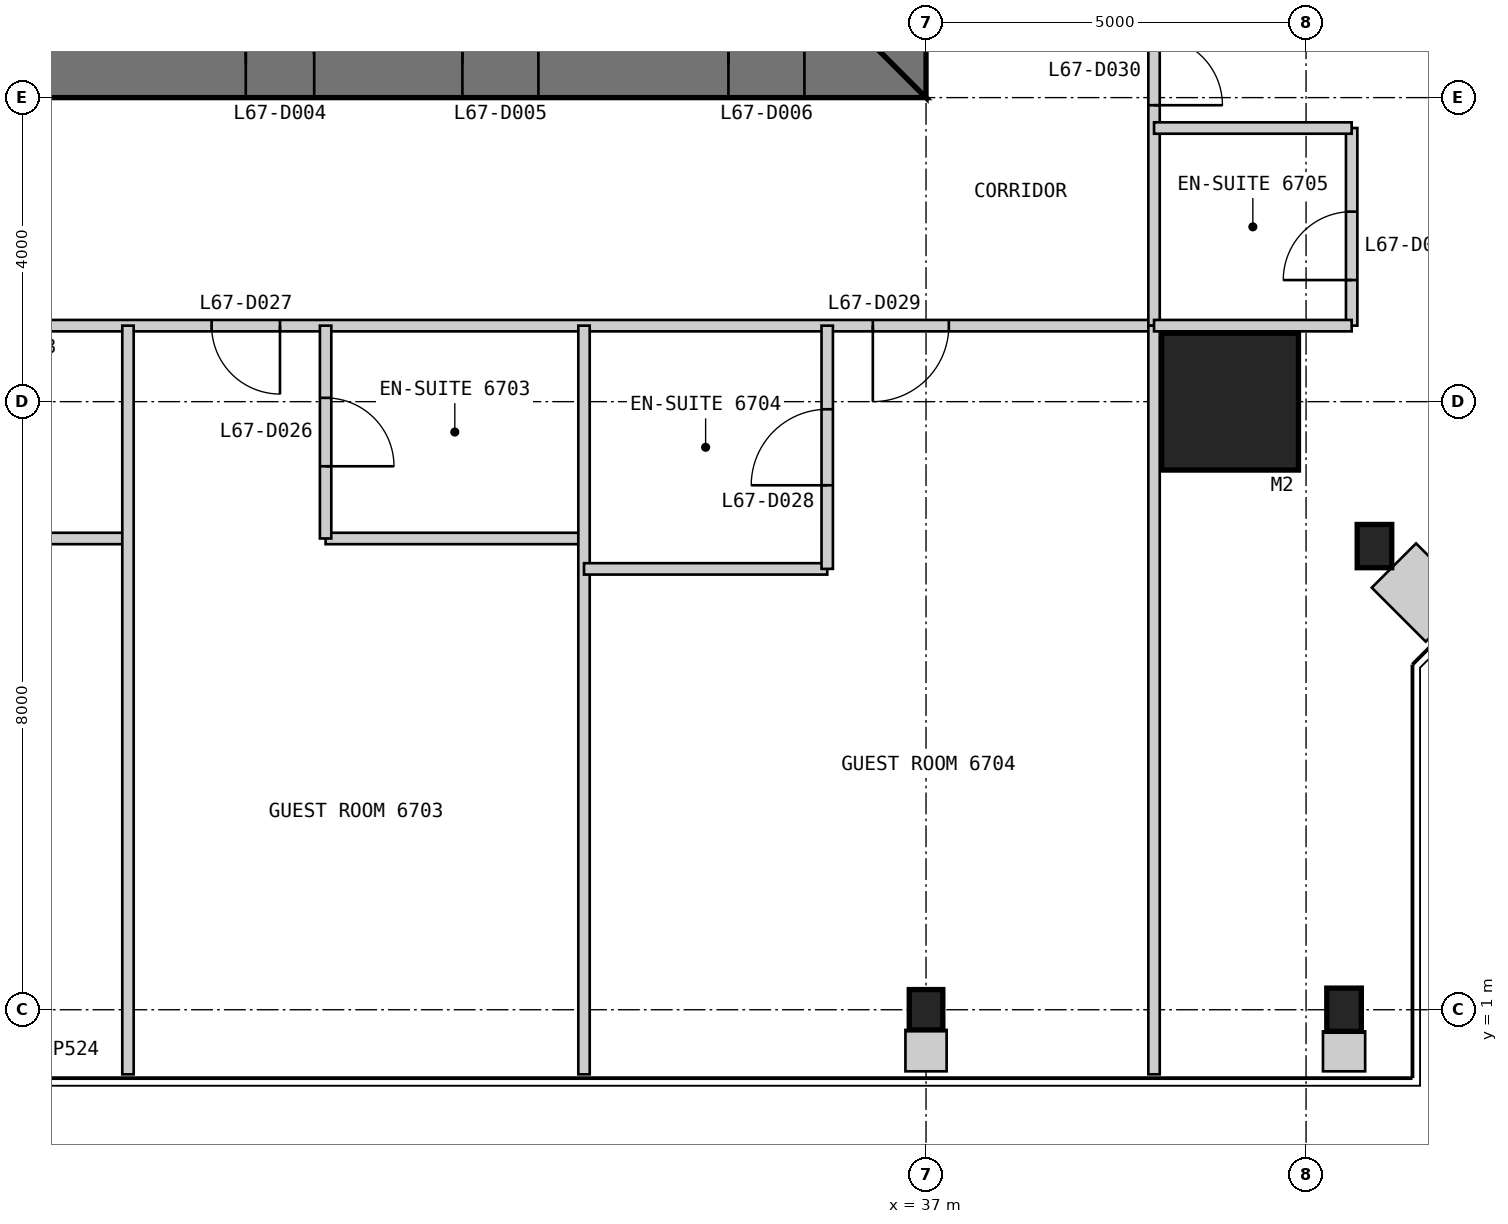
"""IFC4 building model, lengths in metres.
Left out: names, types, materials, properties, quantities, classifications, styles, units other than length and angle.
Written with IfcOpenShell. Run it as: python <this file> out.ifc"""

import sys

from ifc_helpers import new_model, si_unit, direction, frame, frame_2d, origin, origin_2d, place, context, subcontext, project, spatial, polyline, rectangle, i_section, outline, extrude, element, fill, save


model = new_model("IFC4")
c1 = context("Model", 3, precision=1e-05, world=origin(), true_north=direction((0.0, 1.0)))
c2 = subcontext(c1, "Body", "Model", "MODEL_VIEW")
j1 = project(units=[si_unit("LENGTHUNIT", "METRE"), si_unit("PLANEANGLEUNIT", "RADIAN")], contexts=[c1])
p1 = place(None, origin())
s1 = spatial("IfcSite", under=j1, at=p1, CompositionType="ELEMENT")
p2 = place(p1, origin())
s2 = spatial("IfcBuilding", under=s1, at=p2, CompositionType="ELEMENT")
p3 = place(p2, frame((0.0, 0.0, 279.8)))
s3 = spatial("IfcBuildingStorey", under=s2, at=p3, CompositionType="ELEMENT", Elevation=279.8)
p4 = place(p3, frame((41.0, 9.0, 0.0), z_axis=(0.0, 0.0, 1.0), x_axis=(1.0, 0.0, 0.0)))
e1 = element("IfcColumn", 1, at=p4, inside=s3, PredefinedType="COLUMN", context=c2, shape_type="SweptSolid", body=[
    extrude(rectangle(XDim=1.8, YDim=1.8, at=origin_2d()), origin(), (0.0, 0.0, 1.0), 3.4),
])
p5 = place(p3, frame((37.0, 1.0, 0.0), z_axis=(0.0, 0.0, 1.0), x_axis=(1.0, 0.0, 0.0)))
e2 = element("IfcColumn", 2, at=p5, inside=s3, PredefinedType="COLUMN", context=c2, shape_type="SweptSolid", body=[
    extrude(i_section(OverallWidth=0.442, OverallDepth=0.531, WebThickness=0.066, FlangeThickness=0.106, at=origin_2d()), origin(), (0.0, 0.0, 1.0), 3.4),
])
for number, where, z_axis, x_axis in (
    (3, (42.5, 1.0, 0.0), (0.0, 0.0, 1.0), (1.0, 0.0, 0.0)),
    (4, (42.9, 7.1, 0.0), (0.0, 0.0, 1.0), (1.0, 0.0, 0.0)),
):
    element("IfcColumn", number, at=place(p3, frame(where, z_axis=z_axis, x_axis=x_axis)), inside=s3, PredefinedType="COLUMN", context=c2, shape_type="SweptSolid", body=[
        extrude(i_section(OverallWidth=0.455, OverallDepth=0.569, WebThickness=0.078, FlangeThickness=0.125, at=origin_2d()), origin(), (0.0, 0.0, 1.0), 3.4),
    ])
p6 = place(p3, frame((13.0, 13.45, 0.0), z_axis=(0.0, 0.0, 1.0), x_axis=(1.0, 0.0, 0.0)))
e5 = element("IfcWall", 5, at=p6, inside=s3, PredefinedType="SHEAR", context=c2, shape_type="SweptSolid", body=[
    extrude(outline(polyline([(0.0, -0.45), (24.0, -0.45), (23.1, 0.45), (0.9, 0.45), (0.0, -0.45)])), origin(), (0.0, 0.0, 1.0), 3.4),
])
p7 = place(p6, frame((4.9, 0.0, 0.0)))
e6 = element("IfcOpeningElement", 6, at=p7, cuts=e5, PredefinedType="OPENING", context=c2, shape_type="SweptSolid", body=[
    extrude(rectangle(XDim=1.0, YDim=2.2, at=frame_2d((0.5, 1.1))), frame((0.0, 0.46, 0.0), z_axis=(0.0, -1.0, 0.0), x_axis=(1.0, 0.0, 0.0)), (0.0, 0.0, 1.0), 0.92),
])
p8 = place(p6, frame((8.9, 0.0, 0.0)))
e7 = element("IfcOpeningElement", 7, at=p8, cuts=e5, PredefinedType="OPENING", context=c2, shape_type="SweptSolid", body=[
    extrude(rectangle(XDim=1.1, YDim=2.2, at=frame_2d((0.55, 1.1))), frame((0.0, 0.46, 0.0), z_axis=(0.0, -1.0, 0.0), x_axis=(1.0, 0.0, 0.0)), (0.0, 0.0, 1.0), 0.92),
])
p9 = place(p6, frame((15.05, 0.0, 0.0)))
e8 = element("IfcOpeningElement", 8, at=p9, cuts=e5, PredefinedType="OPENING", context=c2, shape_type="SweptSolid", body=[
    extrude(rectangle(XDim=0.9, YDim=2.2, at=frame_2d((0.45, 1.1))), frame((0.0, 0.46, 0.0), z_axis=(0.0, -1.0, 0.0), x_axis=(1.0, 0.0, 0.0)), (0.0, 0.0, 1.0), 0.92),
])
p10 = place(p6, frame((17.9, 0.0, 0.0)))
e9 = element("IfcOpeningElement", 9, at=p10, cuts=e5, PredefinedType="OPENING", context=c2, shape_type="SweptSolid", body=[
    extrude(rectangle(XDim=1.0, YDim=2.2, at=frame_2d((0.5, 1.1))), frame((0.0, 0.46, 0.0), z_axis=(0.0, -1.0, 0.0), x_axis=(1.0, 0.0, 0.0)), (0.0, 0.0, 1.0), 0.92),
])
p11 = place(p6, frame((21.4, 0.0, 0.0)))
e10 = element("IfcOpeningElement", 10, at=p11, cuts=e5, PredefinedType="OPENING", context=c2, shape_type="SweptSolid", body=[
    extrude(rectangle(XDim=1.0, YDim=2.2, at=frame_2d((0.5, 1.1))), frame((0.0, 0.46, 0.0), z_axis=(0.0, -1.0, 0.0), x_axis=(1.0, 0.0, 0.0)), (0.0, 0.0, 1.0), 0.92),
])
p12 = place(p3, frame((36.55, 13.9, 0.0), z_axis=(0.0, 0.0, 1.0), x_axis=(0.0, 1.0, 0.0)))
e11 = element("IfcWall", 11, at=p12, inside=s3, PredefinedType="SHEAR", context=c2, shape_type="SweptSolid", body=[
    extrude(outline(polyline([(-0.9, -0.45), (23.1, -0.45), (22.2, 0.45), (0.0, 0.45), (-0.9, -0.45)])), origin(), (0.0, 0.0, 1.0), 3.4),
])
p13 = place(p12, frame((20.2, 0.0, 0.0)))
e12 = element("IfcOpeningElement", 12, at=p13, cuts=e11, PredefinedType="OPENING", context=c2, shape_type="SweptSolid", body=[
    extrude(rectangle(XDim=1.0, YDim=2.2, at=frame_2d((0.5, 1.1))), frame((0.0, 0.46, 0.0), z_axis=(0.0, -1.0, 0.0), x_axis=(1.0, 0.0, 0.0)), (0.0, 0.0, 1.0), 0.92),
])
p14 = place(p12, frame((17.25, 0.0, 0.0)))
e13 = element("IfcOpeningElement", 13, at=p14, cuts=e11, PredefinedType="OPENING", context=c2, shape_type="SweptSolid", body=[
    extrude(rectangle(XDim=0.9, YDim=2.2, at=frame_2d((0.45, 1.1))), frame((0.0, 0.46, 0.0), z_axis=(0.0, -1.0, 0.0), x_axis=(1.0, 0.0, 0.0)), (0.0, 0.0, 1.0), 0.92),
])
p15 = place(p3, frame((10.0, 10.0, 0.0), z_axis=(0.0, 0.0, 1.0), x_axis=(1.0, 0.0, 0.0)))
e14 = element("IfcWall", 14, at=p15, inside=s3, PredefinedType="PARTITIONING", context=c2, shape_type="SweptSolid", body=[
    extrude(rectangle(XDim=30.0, YDim=0.15, at=frame_2d((15.0, 0.0))), origin(), (0.0, 0.0, 1.0), 3.25),
])
p16 = place(p15, frame((2.9, 0.0, 0.0)))
e15 = element("IfcOpeningElement", 15, at=p16, cuts=e14, PredefinedType="OPENING", context=c2, shape_type="SweptSolid", body=[
    extrude(rectangle(XDim=0.9, YDim=2.1, at=frame_2d((0.45, 1.05))), frame((0.0, 0.085, 0.0), z_axis=(0.0, -1.0, 0.0), x_axis=(1.0, 0.0, 0.0)), (0.0, 0.0, 1.0), 0.17),
])
p17 = place(p15, frame((11.2, 0.0, 0.0)))
e16 = element("IfcOpeningElement", 16, at=p17, cuts=e14, PredefinedType="OPENING", context=c2, shape_type="SweptSolid", body=[
    extrude(rectangle(XDim=0.9, YDim=2.1, at=frame_2d((0.45, 1.05))), frame((0.0, 0.085, 0.0), z_axis=(0.0, -1.0, 0.0), x_axis=(1.0, 0.0, 0.0)), (0.0, 0.0, 1.0), 0.17),
])
p18 = place(p15, frame((17.6, 0.0, 0.0)))
e17 = element("IfcOpeningElement", 17, at=p18, cuts=e14, PredefinedType="OPENING", context=c2, shape_type="SweptSolid", body=[
    extrude(rectangle(XDim=0.9, YDim=2.1, at=frame_2d((0.45, 1.05))), frame((0.0, 0.085, 0.0), z_axis=(0.0, -1.0, 0.0), x_axis=(1.0, 0.0, 0.0)), (0.0, 0.0, 1.0), 0.17),
])
p19 = place(p15, frame((26.3, 0.0, 0.0)))
e18 = element("IfcOpeningElement", 18, at=p19, cuts=e14, PredefinedType="OPENING", context=c2, shape_type="SweptSolid", body=[
    extrude(rectangle(XDim=1.0, YDim=2.1, at=frame_2d((0.5, 1.05))), frame((0.0, 0.085, 0.0), z_axis=(0.0, -1.0, 0.0), x_axis=(1.0, 0.0, 0.0)), (0.0, 0.0, 1.0), 0.17),
])
p20 = place(p3, frame((22.7, 7.2, 0.0), z_axis=(0.0, 0.0, 1.0), x_axis=(1.0, 0.0, 0.0)))
e19 = element("IfcWall", 19, at=p20, inside=s3, PredefinedType="PARTITIONING", context=c2, shape_type="SweptSolid", body=[
    extrude(rectangle(XDim=3.8, YDim=0.15, at=frame_2d((1.9, 0.0))), origin(), (0.0, 0.0, 1.0), 3.25),
])
p21 = place(p3, frame((26.5, 0.15, 0.0), z_axis=(0.0, 0.0, 1.0), x_axis=(0.0, 1.0, 0.0)))
e20 = element("IfcWall", 20, at=p21, inside=s3, PredefinedType="PARTITIONING", context=c2, shape_type="SweptSolid", body=[
    extrude(rectangle(XDim=9.85, YDim=0.15, at=frame_2d((4.925, 0.0))), origin(), (0.0, 0.0, 1.0), 3.25),
])
p22 = place(p3, frame((29.1, 7.2, 0.0), z_axis=(0.0, 0.0, 1.0), x_axis=(1.0, 0.0, 0.0)))
e21 = element("IfcWall", 21, at=p22, inside=s3, PredefinedType="PARTITIONING", context=c2, shape_type="SweptSolid", body=[
    extrude(rectangle(XDim=3.4, YDim=0.15, at=frame_2d((1.7, 0.0))), origin(), (0.0, 0.0, 1.0), 3.25),
])
p23 = place(p3, frame((29.1, 7.2, 0.0), z_axis=(0.0, 0.0, 1.0), x_axis=(0.0, 1.0, 0.0)))
e22 = element("IfcWall", 22, at=p23, inside=s3, PredefinedType="PARTITIONING", context=c2, shape_type="SweptSolid", body=[
    extrude(rectangle(XDim=2.8, YDim=0.15, at=frame_2d((1.4, 0.0))), origin(), (0.0, 0.0, 1.0), 3.25),
])
p24 = place(p23, frame((0.95, 0.0, 0.0)))
e23 = element("IfcOpeningElement", 23, at=p24, cuts=e22, PredefinedType="OPENING", context=c2, shape_type="SweptSolid", body=[
    extrude(rectangle(XDim=0.9, YDim=2.1, at=frame_2d((0.45, 1.05))), frame((0.0, 0.085, 0.0), z_axis=(0.0, -1.0, 0.0), x_axis=(1.0, 0.0, 0.0)), (0.0, 0.0, 1.0), 0.17),
])
p25 = place(p3, frame((32.5, 0.15, 0.0), z_axis=(0.0, 0.0, 1.0), x_axis=(0.0, 1.0, 0.0)))
e24 = element("IfcWall", 24, at=p25, inside=s3, PredefinedType="PARTITIONING", context=c2, shape_type="SweptSolid", body=[
    extrude(rectangle(XDim=9.85, YDim=0.15, at=frame_2d((4.925, 0.0))), origin(), (0.0, 0.0, 1.0), 3.25),
])
p26 = place(p3, frame((32.5, 6.8, 0.0), z_axis=(0.0, 0.0, 1.0), x_axis=(1.0, 0.0, 0.0)))
e25 = element("IfcWall", 25, at=p26, inside=s3, PredefinedType="PARTITIONING", context=c2, shape_type="SweptSolid", body=[
    extrude(rectangle(XDim=3.2, YDim=0.15, at=frame_2d((1.6, 0.0))), origin(), (0.0, 0.0, 1.0), 3.25),
])
p27 = place(p3, frame((35.7, 6.8, 0.0), z_axis=(0.0, 0.0, 1.0), x_axis=(0.0, 1.0, 0.0)))
e26 = element("IfcWall", 26, at=p27, inside=s3, PredefinedType="PARTITIONING", context=c2, shape_type="SweptSolid", body=[
    extrude(rectangle(XDim=3.2, YDim=0.15, at=frame_2d((1.6, 0.0))), origin(), (0.0, 0.0, 1.0), 3.25),
])
p28 = place(p27, frame((1.1, 0.0, 0.0)))
e27 = element("IfcOpeningElement", 27, at=p28, cuts=e26, PredefinedType="OPENING", context=c2, shape_type="SweptSolid", body=[
    extrude(rectangle(XDim=1.0, YDim=2.1, at=frame_2d((0.5, 1.05))), frame((0.0, 0.085, 0.0), z_axis=(0.0, -1.0, 0.0), x_axis=(1.0, 0.0, 0.0)), (0.0, 0.0, 1.0), 0.17),
])
p29 = place(p3, frame((40.0, 10.0, 0.0), z_axis=(0.0, 0.0, 1.0), x_axis=(0.0, 1.0, 0.0)))
e28 = element("IfcWall", 28, at=p29, inside=s3, PredefinedType="PARTITIONING", context=c2, shape_type="SweptSolid", body=[
    extrude(rectangle(XDim=30.0, YDim=0.15, at=frame_2d((15.0, 0.0))), origin(), (0.0, 0.0, 1.0), 2.638),
])
p30 = place(p29, frame((2.9, 0.0, 0.0)))
e29 = element("IfcOpeningElement", 29, at=p30, cuts=e28, PredefinedType="OPENING", context=c2, shape_type="SweptSolid", body=[
    extrude(rectangle(XDim=0.9, YDim=2.1, at=frame_2d((0.45, 1.05))), frame((0.0, 0.085, 0.0), z_axis=(0.0, -1.0, 0.0), x_axis=(1.0, 0.0, 0.0)), (0.0, 0.0, 1.0), 0.17),
])
p31 = place(p29, frame((11.2, 0.0, 0.0)))
e30 = element("IfcOpeningElement", 30, at=p31, cuts=e28, PredefinedType="OPENING", context=c2, shape_type="SweptSolid", body=[
    extrude(rectangle(XDim=0.9, YDim=2.1, at=frame_2d((0.45, 1.05))), frame((0.0, 0.085, 0.0), z_axis=(0.0, -1.0, 0.0), x_axis=(1.0, 0.0, 0.0)), (0.0, 0.0, 1.0), 0.17),
])
p32 = place(p29, frame((24.7, 0.0, 0.0)))
e31 = element("IfcOpeningElement", 31, at=p32, cuts=e28, PredefinedType="OPENING", context=c2, shape_type="SweptSolid", body=[
    extrude(rectangle(XDim=0.9, YDim=2.1, at=frame_2d((0.45, 1.05))), frame((0.0, 0.085, 0.0), z_axis=(0.0, -1.0, 0.0), x_axis=(1.0, 0.0, 0.0)), (0.0, 0.0, 1.0), 0.17),
])
p33 = place(p3, frame((40.0, 0.15, 0.0), z_axis=(0.0, 0.0, 1.0), x_axis=(0.0, 1.0, 0.0)))
e32 = element("IfcWall", 32, at=p33, inside=s3, PredefinedType="PARTITIONING", context=c2, shape_type="SweptSolid", body=[
    extrude(rectangle(XDim=9.85, YDim=0.15, at=frame_2d((4.925, 0.0))), origin(), (0.0, 0.0, 1.0), 3.25),
])
p34 = place(p3, frame((42.6, 10.0, 0.0), z_axis=(0.0, 0.0, 1.0), x_axis=(0.0, 1.0, 0.0)))
e33 = element("IfcWall", 33, at=p34, inside=s3, PredefinedType="PARTITIONING", context=c2, shape_type="SweptSolid", body=[
    extrude(rectangle(XDim=2.6, YDim=0.15, at=frame_2d((1.3, 0.0))), origin(), (0.0, 0.0, 1.0), 3.25),
])
p35 = place(p34, frame((0.6, 0.0, 0.0)))
e34 = element("IfcOpeningElement", 34, at=p35, cuts=e33, PredefinedType="OPENING", context=c2, shape_type="SweptSolid", body=[
    extrude(rectangle(XDim=0.9, YDim=2.1, at=frame_2d((0.45, 1.05))), frame((0.0, 0.085, 0.0), z_axis=(0.0, -1.0, 0.0), x_axis=(1.0, 0.0, 0.0)), (0.0, 0.0, 1.0), 0.17),
])
for number, where, z_axis, x_axis in (
    (35, (42.6, 10.0, 0.0), (0.0, 0.0, 1.0), (-1.0, 0.0, 0.0)),
    (36, (42.6, 12.6, 0.0), (0.0, 0.0, 1.0), (-1.0, 0.0, 0.0)),
):
    element("IfcWall", number, at=place(p3, frame(where, z_axis=z_axis, x_axis=x_axis)), inside=s3, PredefinedType="PARTITIONING", context=c2, shape_type="SweptSolid", body=[
        extrude(rectangle(XDim=2.6, YDim=0.15, at=frame_2d((1.3, 0.0))), origin(), (0.0, 0.0, 1.0), 3.25),
    ])
p36 = place(p3, frame((37.0, 0.19, 0.0), z_axis=(0.0, 0.0, 1.0), x_axis=(0.0, 1.0, 0.0)))
e37 = element("IfcWall", 37, at=p36, inside=s3, PredefinedType="PARTITIONING", context=c2, shape_type="SweptSolid", body=[
    extrude(rectangle(XDim=0.545, YDim=0.542, at=frame_2d((0.272, 0.0))), origin(), (0.0, 0.0, 1.0), 3.25),
])
p37 = place(p3, frame((42.5, 0.19, 0.0), z_axis=(0.0, 0.0, 1.0), x_axis=(0.0, 1.0, 0.0)))
e38 = element("IfcWall", 38, at=p37, inside=s3, PredefinedType="PARTITIONING", context=c2, shape_type="SweptSolid", body=[
    extrude(rectangle(XDim=0.526, YDim=0.555, at=frame_2d((0.263, 0.0))), origin(), (0.0, 0.0, 1.0), 3.25),
])
p38 = place(p3, frame((43.866, 6.134, 0.0), z_axis=(0.0, 0.0, 1.0), x_axis=(-0.707106781187, 0.707106781187, 0.0)))
e39 = element("IfcWall", 39, at=p38, inside=s3, PredefinedType="PARTITIONING", context=c2, shape_type="SweptSolid", body=[
    extrude(rectangle(XDim=1.004, YDim=0.824, at=frame_2d((0.502, 0.0))), origin(), (0.0, 0.0, 1.0), 3.25),
])
p39 = place(p9, origin())
e40 = element("IfcDoor", 40, at=p39, inside=s3, OperationType="SINGLE_SWING_LEFT", PredefinedType="DOOR", context=c2, shape_type="SweptSolid", body=[
    extrude(rectangle(XDim=0.9, YDim=2.2, at=frame_2d((0.45, 1.1))), frame((0.0, 0.025, 0.0), z_axis=(0.0, -1.0, 0.0), x_axis=(1.0, 0.0, 0.0)), (0.0, 0.0, 1.0), 0.05),
    extrude(outline(polyline([(0.0, 0.0), (0.04, 0.0), (0.04, 2.16), (0.86, 2.16), (0.86, 0.0), (0.9, 0.0), (0.9, 2.2), (0.0, 2.2), (0.0, 0.0)])), frame((0.0, 0.3, 0.0), z_axis=(0.0, -1.0, 0.0), x_axis=(1.0, 0.0, 0.0)), (0.0, 0.0, 1.0), 0.6),
])
fill(e8, e40)
p40 = place(p10, origin())
e41 = element("IfcDoor", 41, at=p40, inside=s3, OperationType="SINGLE_SWING_LEFT", PredefinedType="DOOR", context=c2, shape_type="SweptSolid", body=[
    extrude(rectangle(XDim=1.0, YDim=2.2, at=frame_2d((0.5, 1.1))), frame((0.0, 0.025, 0.0), z_axis=(0.0, -1.0, 0.0), x_axis=(1.0, 0.0, 0.0)), (0.0, 0.0, 1.0), 0.05),
    extrude(outline(polyline([(0.0, 0.0), (0.04, 0.0), (0.04, 2.16), (0.96, 2.16), (0.96, 0.0), (1.0, 0.0), (1.0, 2.2), (0.0, 2.2), (0.0, 0.0)])), frame((0.0, 0.3, 0.0), z_axis=(0.0, -1.0, 0.0), x_axis=(1.0, 0.0, 0.0)), (0.0, 0.0, 1.0), 0.6),
])
fill(e9, e41)
p41 = place(p11, origin())
e42 = element("IfcDoor", 42, at=p41, inside=s3, OperationType="SINGLE_SWING_LEFT", PredefinedType="DOOR", context=c2, shape_type="SweptSolid", body=[
    extrude(rectangle(XDim=1.0, YDim=2.2, at=frame_2d((0.5, 1.1))), frame((0.0, 0.025, 0.0), z_axis=(0.0, -1.0, 0.0), x_axis=(1.0, 0.0, 0.0)), (0.0, 0.0, 1.0), 0.05),
    extrude(outline(polyline([(0.0, 0.0), (0.04, 0.0), (0.04, 2.16), (0.96, 2.16), (0.96, 0.0), (1.0, 0.0), (1.0, 2.2), (0.0, 2.2), (0.0, 0.0)])), frame((0.0, 0.3, 0.0), z_axis=(0.0, -1.0, 0.0), x_axis=(1.0, 0.0, 0.0)), (0.0, 0.0, 1.0), 0.6),
])
fill(e10, e42)
p42 = place(p24, frame((0.9, 0.0, 0.0), z_axis=(0.0, 0.0, 1.0), x_axis=(-1.0, 0.0, 0.0)))
e43 = element("IfcDoor", 43, at=p42, inside=s3, OperationType="SINGLE_SWING_RIGHT", PredefinedType="DOOR", context=c2, shape_type="SweptSolid", body=[
    extrude(rectangle(XDim=0.9, YDim=2.1, at=frame_2d((0.45, 1.05))), frame((0.0, 0.025, 0.0), z_axis=(0.0, -1.0, 0.0), x_axis=(1.0, 0.0, 0.0)), (0.0, 0.0, 1.0), 0.05),
])
fill(e23, e43)
p43 = place(p18, frame((0.9, 0.0, 0.0), z_axis=(0.0, 0.0, 1.0), x_axis=(-1.0, 0.0, 0.0)))
e44 = element("IfcDoor", 44, at=p43, inside=s3, OperationType="SINGLE_SWING_LEFT", PredefinedType="DOOR", context=c2, shape_type="SweptSolid", body=[
    extrude(rectangle(XDim=0.9, YDim=2.1, at=frame_2d((0.45, 1.05))), frame((0.0, 0.025, 0.0), z_axis=(0.0, -1.0, 0.0), x_axis=(1.0, 0.0, 0.0)), (0.0, 0.0, 1.0), 0.05),
])
fill(e17, e44)
p44 = place(p28, origin())
e45 = element("IfcDoor", 45, at=p44, inside=s3, OperationType="SINGLE_SWING_LEFT", PredefinedType="DOOR", context=c2, shape_type="SweptSolid", body=[
    extrude(rectangle(XDim=1.0, YDim=2.1, at=frame_2d((0.5, 1.05))), frame((0.0, 0.025, 0.0), z_axis=(0.0, -1.0, 0.0), x_axis=(1.0, 0.0, 0.0)), (0.0, 0.0, 1.0), 0.05),
])
fill(e27, e45)
p45 = place(p19, frame((1.0, 0.0, 0.0), z_axis=(0.0, 0.0, 1.0), x_axis=(-1.0, 0.0, 0.0)))
e46 = element("IfcDoor", 46, at=p45, inside=s3, OperationType="SINGLE_SWING_RIGHT", PredefinedType="DOOR", context=c2, shape_type="SweptSolid", body=[
    extrude(rectangle(XDim=1.0, YDim=2.1, at=frame_2d((0.5, 1.05))), frame((0.0, 0.025, 0.0), z_axis=(0.0, -1.0, 0.0), x_axis=(1.0, 0.0, 0.0)), (0.0, 0.0, 1.0), 0.05),
])
fill(e18, e46)
p46 = place(p30, frame((0.9, 0.0, 0.0), z_axis=(0.0, 0.0, 1.0), x_axis=(-1.0, 0.0, 0.0)))
e47 = element("IfcDoor", 47, at=p46, inside=s3, OperationType="SINGLE_SWING_RIGHT", PredefinedType="DOOR", context=c2, shape_type="SweptSolid", body=[
    extrude(rectangle(XDim=0.9, YDim=2.1, at=frame_2d((0.45, 1.05))), frame((0.0, 0.025, 0.0), z_axis=(0.0, -1.0, 0.0), x_axis=(1.0, 0.0, 0.0)), (0.0, 0.0, 1.0), 0.05),
])
fill(e29, e47)
p47 = place(p35, origin())
e48 = element("IfcDoor", 48, at=p47, inside=s3, OperationType="SINGLE_SWING_LEFT", PredefinedType="DOOR", context=c2, shape_type="SweptSolid", body=[
    extrude(rectangle(XDim=0.9, YDim=2.1, at=frame_2d((0.45, 1.05))), frame((0.0, 0.025, 0.0), z_axis=(0.0, -1.0, 0.0), x_axis=(1.0, 0.0, 0.0)), (0.0, 0.0, 1.0), 0.05),
])
fill(e34, e48)
save(model, sys.argv[1])
